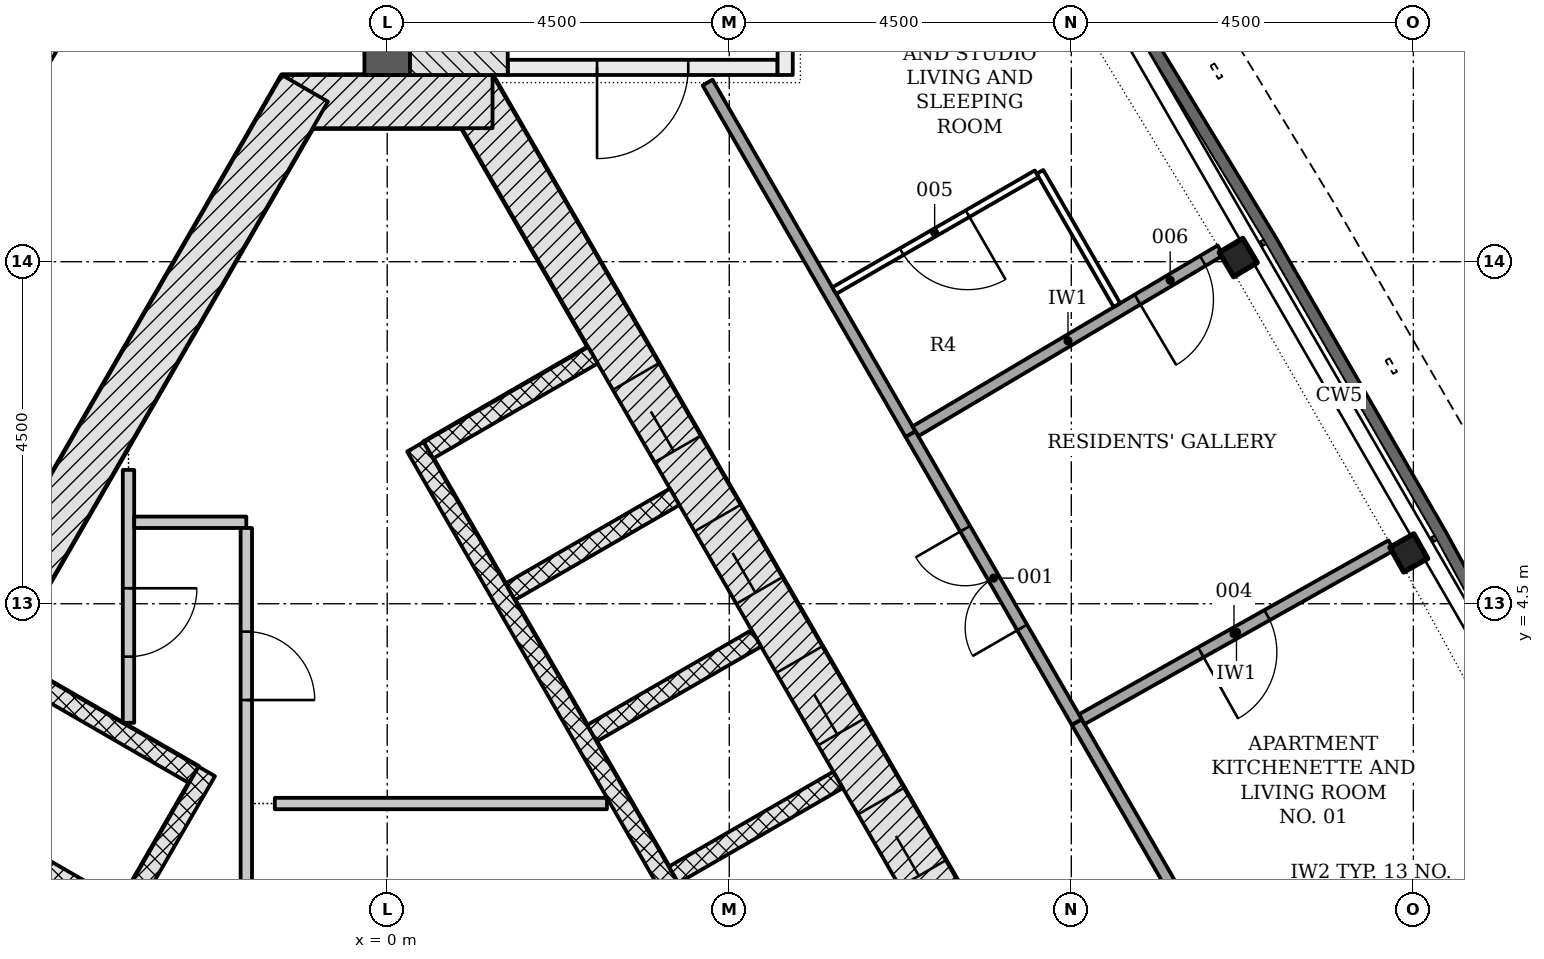
"""IFC4 building model, lengths in metres.
Left out: names, types, materials, properties, quantities, classifications, styles, units other than length and angle.
Written with IfcOpenShell. Run it as: python <this file> out.ifc"""

import sys

from ifc_helpers import new_model, si_unit, direction, frame, frame_2d, origin, origin_2d, place, context, subcontext, project, spatial, rectangle, i_section, extrude, element, fill, save


model = new_model("IFC4")
c1 = context("Model", 3, precision=1e-05, world=origin(), true_north=direction((0.0, 1.0)))
c2 = subcontext(c1, "Body", "Model", "MODEL_VIEW")
j1 = project(units=[si_unit("LENGTHUNIT", "METRE"), si_unit("PLANEANGLEUNIT", "RADIAN")], contexts=[c1])
p1 = place(None, origin())
s1 = spatial("IfcSite", under=j1, at=p1, CompositionType="ELEMENT")
p2 = place(p1, origin())
s2 = spatial("IfcBuilding", under=s1, at=p2, CompositionType="ELEMENT")
p3 = place(p2, frame((0.0, 0.0, 263.4)))
s3 = spatial("IfcBuildingStorey", under=s2, at=p3, CompositionType="ELEMENT", Elevation=263.4)
p4 = place(p3, frame((10.311, -4.703, -0.2), z_axis=(0.0, 0.0, 1.0), x_axis=(-0.500001446645, 0.866024568562, 0.0)))
e1 = element("IfcWall", 1, at=p4, inside=s3, PredefinedType="SHEAR", context=c2, shape_type="SweptSolid", body=[
    extrude(rectangle(XDim=18.458, YDim=0.7, at=frame_2d((9.229, 0.0))), origin(), (0.0, 0.0, 1.0), 3.6),
])
p5 = place(p4, frame((4.379, 0.0, 0.2)))
e2 = element("IfcOpeningElement", 2, at=p5, cuts=e1, PredefinedType="OPENING", context=c2, shape_type="SweptSolid", body=[
    extrude(rectangle(XDim=1.1, YDim=2.1, at=frame_2d((0.55, 1.05))), frame((0.0, 0.36, 0.0), z_axis=(0.0, -1.0, 0.0), x_axis=(1.0, 0.0, 0.0)), (0.0, 0.0, 1.0), 0.72),
])
p6 = place(p4, frame((6.529, 0.0, 0.2)))
e3 = element("IfcOpeningElement", 3, at=p6, cuts=e1, PredefinedType="OPENING", context=c2, shape_type="SweptSolid", body=[
    extrude(rectangle(XDim=1.1, YDim=2.1, at=frame_2d((0.55, 1.05))), frame((0.0, 0.36, 0.0), z_axis=(0.0, -1.0, 0.0), x_axis=(1.0, 0.0, 0.0)), (0.0, 0.0, 1.0), 0.72),
])
p7 = place(p4, frame((8.679, 0.0, 0.2)))
e4 = element("IfcOpeningElement", 4, at=p7, cuts=e1, PredefinedType="OPENING", context=c2, shape_type="SweptSolid", body=[
    extrude(rectangle(XDim=1.1, YDim=2.1, at=frame_2d((0.55, 1.05))), frame((0.0, 0.36, 0.0), z_axis=(0.0, -1.0, 0.0), x_axis=(1.0, 0.0, 0.0)), (0.0, 0.0, 1.0), 0.72),
])
p8 = place(p4, frame((10.829, 0.0, 0.2)))
e5 = element("IfcOpeningElement", 5, at=p8, cuts=e1, PredefinedType="OPENING", context=c2, shape_type="SweptSolid", body=[
    extrude(rectangle(XDim=1.1, YDim=2.1, at=frame_2d((0.55, 1.05))), frame((0.0, 0.36, 0.0), z_axis=(0.0, -1.0, 0.0), x_axis=(1.0, 0.0, 0.0)), (0.0, 0.0, 1.0), 0.72),
])
p9 = place(p4, frame((12.979, 0.0, 0.2)))
e6 = element("IfcOpeningElement", 6, at=p9, cuts=e1, PredefinedType="OPENING", context=c2, shape_type="SweptSolid", body=[
    extrude(rectangle(XDim=1.1, YDim=2.1, at=frame_2d((0.55, 1.05))), frame((0.0, 0.36, 0.0), z_axis=(0.0, -1.0, 0.0), x_axis=(1.0, 0.0, 0.0)), (0.0, 0.0, 1.0), 0.72),
])
p10 = place(p3, frame((1.386, 11.106, -0.2), z_axis=(0.0, 0.0, 1.0), x_axis=(-1.0, 0.0, 0.0)))
e7 = element("IfcWall", 7, at=p10, inside=s3, PredefinedType="SHEAR", context=c2, shape_type="SweptSolid", body=[
    extrude(rectangle(XDim=2.771, YDim=0.7, at=frame_2d((1.386, 0.0))), origin(), (0.0, 0.0, 1.0), 3.6),
])
p11 = place(p3, frame((-1.083, 11.281, -0.2), z_axis=(0.0, 0.0, 1.0), x_axis=(-0.500001446645, -0.866024568562, 0.0)))
e8 = element("IfcWall", 8, at=p11, inside=s3, PredefinedType="SHEAR", context=c2, shape_type="SweptSolid", body=[
    extrude(rectangle(XDim=18.458, YDim=0.7, at=frame_2d((9.229, 0.0))), origin(), (0.0, 0.0, 1.0), 3.6),
])
p12 = place(p11, frame((8.979, 0.0, 0.2)))
e9 = element("IfcOpeningElement", 9, at=p12, cuts=e8, PredefinedType="OPENING", context=c2, shape_type="SweptSolid", body=[
    extrude(rectangle(XDim=1.2, YDim=2.1, at=frame_2d((0.6, 1.05))), frame((0.0, 0.36, 0.0), z_axis=(0.0, -1.0, 0.0), x_axis=(1.0, 0.0, 0.0)), (0.0, 0.0, 1.0), 0.72),
])
p13 = place(p11, frame((11.029, 0.0, 0.2)))
e10 = element("IfcOpeningElement", 10, at=p13, cuts=e8, PredefinedType="OPENING", context=c2, shape_type="SweptSolid", body=[
    extrude(rectangle(XDim=1.2, YDim=2.1, at=frame_2d((0.6, 1.05))), frame((0.0, 0.36, 0.0), z_axis=(0.0, -1.0, 0.0), x_axis=(1.0, 0.0, 0.0)), (0.0, 0.0, 1.0), 0.72),
])
p14 = place(p3, frame((0.0, 11.456, -0.2), z_axis=(0.0, 0.0, 1.0), x_axis=(0.0, 1.0, 0.0)))
e11 = element("IfcWall", 11, at=p14, inside=s3, PredefinedType="SHEAR", context=c2, shape_type="SweptSolid", body=[
    extrude(rectangle(XDim=6.679, YDim=0.6, at=frame_2d((3.339, 0.0))), origin(), (0.0, 0.0, 1.0), 3.6),
])
for number, where, z_axis, x_axis in (
    (12, (13.44, 5.169, -0.2), (0.0, 0.0, 1.0), (-0.49, 0.872, 0.0)),
    (13, (11.196, 9.055, -0.2), (0.0, 0.0, 1.0), (-0.51, 0.86, 0.0)),
):
    element("IfcColumn", number, at=place(p3, frame(where, z_axis=z_axis, x_axis=x_axis)), inside=s3, PredefinedType="COLUMN", context=c2, shape_type="SweptSolid", body=[
        extrude(i_section(OverallWidth=0.371, OverallDepth=0.361, WebThickness=0.012, FlangeThickness=0.02, FilletRadius=0.015, at=origin_2d()), origin(), (0.0, 0.0, 1.0), 3.6),
    ])
p15 = place(p3, frame((5.931, 2.183, -0.2), z_axis=(0.0, 0.0, 1.0), x_axis=(-0.866047370643, -0.499961950354, 0.0)))
e14 = element("IfcWall", 14, at=p15, inside=s3, PredefinedType="PARTITIONING", context=c2, shape_type="SweptSolid", body=[
    extrude(rectangle(XDim=2.5, YDim=0.25, at=frame_2d((1.25, 0.0))), origin(), (0.0, 0.0, 1.0), 3.6),
])
for number, where, z_axis, x_axis in (
    (15, (4.856, 4.045, -0.2), (0.0, 0.0, 1.0), (-0.866, -0.5, 0.0)),
    (16, (3.781, 5.907, -0.2), (0.0, 0.0, 1.0), (-0.866, -0.5, 0.0)),
    (17, (2.706, 7.769, -0.2), (0.0, 0.0, 1.0), (-0.866, -0.5, 0.0)),
):
    element("IfcWall", number, at=place(p3, frame(where, z_axis=z_axis, x_axis=x_axis)), inside=s3, PredefinedType="PARTITIONING", context=c2, shape_type="SweptSolid", body=[
        extrude(rectangle(XDim=2.5, YDim=0.25, at=frame_2d((1.25, 0.0))), origin(), (0.0, 0.0, 1.0), 3.6),
    ])
p16 = place(p3, frame((5.87, -2.961, 0.0), z_axis=(0.0, 0.0, 1.0), x_axis=(-0.50000615651, 0.866021849293, 0.0)))
e18 = element("IfcWall", 18, at=p16, inside=s3, PredefinedType="PARTITIONING", context=c2, shape_type="SweptSolid", body=[
    extrude(rectangle(XDim=11.0, YDim=0.25, at=frame_2d((5.5, 0.0))), origin(), (0.0, 0.0, 1.0), 3.4),
])
for number, where, z_axis, x_axis in (
    (19, (-5.056, 3.699, -0.2), (0.0, 0.0, 1.0), (0.866, -0.5, 0.0)),
    (20, (-6.081, 1.923, -0.2), (0.0, 0.0, 1.0), (0.866, -0.5, 0.0)),
):
    element("IfcWall", number, at=place(p3, frame(where, z_axis=z_axis, x_axis=x_axis)), inside=s3, PredefinedType="PARTITIONING", context=c2, shape_type="SweptSolid", body=[
        extrude(rectangle(XDim=2.9, YDim=0.25, at=frame_2d((1.45, 0.0))), origin(), (0.0, 0.0, 1.0), 3.6),
    ])
p17 = place(p3, frame((-2.374, 2.294, 0.0), z_axis=(0.0, 0.0, 1.0), x_axis=(-0.500003174267, -0.866023571113, 0.0)))
e21 = element("IfcWall", 21, at=p17, inside=s3, PredefinedType="PARTITIONING", context=c2, shape_type="SweptSolid", body=[
    extrude(rectangle(XDim=6.7, YDim=0.25, at=frame_2d((3.35, 0.0))), origin(), (0.0, 0.0, 1.0), 3.4),
])
p18 = place(p3, frame((-3.404, 6.261, 0.0), z_axis=(0.0, 0.0, 1.0), x_axis=(0.0, -1.0, 0.0)))
e22 = element("IfcWall", 22, at=p18, inside=s3, PredefinedType="PARTITIONING", context=c2, shape_type="SweptSolid", body=[
    extrude(rectangle(XDim=3.327, YDim=0.15, at=frame_2d((1.664, 0.0))), origin(), (0.0, 0.0, 1.0), 3.4),
])
p19 = place(p18, frame((1.557, 0.0, 0.0)))
e23 = element("IfcOpeningElement", 23, at=p19, cuts=e22, PredefinedType="OPENING", context=c2, shape_type="SweptSolid", body=[
    extrude(rectangle(XDim=0.9, YDim=2.1, at=frame_2d((0.45, 1.05))), frame((0.0, 0.085, 0.0), z_axis=(0.0, -1.0, 0.0), x_axis=(1.0, 0.0, 0.0)), (0.0, 0.0, 1.0), 0.17),
])
p20 = place(p3, frame((-3.329, 5.572, 0.0), z_axis=(0.0, 0.0, 1.0), x_axis=(1.0, 0.0, 0.0)))
e24 = element("IfcWall", 24, at=p20, inside=s3, PredefinedType="PARTITIONING", context=c2, shape_type="SweptSolid", body=[
    extrude(rectangle(XDim=1.475, YDim=0.15, at=frame_2d((0.737, 0.0))), origin(), (0.0, 0.0, 1.0), 3.4),
])
p21 = place(p3, frame((-1.854, 5.497, 0.0), z_axis=(0.0, 0.0, 1.0), x_axis=(0.0, -1.0, 0.0)))
e25 = element("IfcWall", 25, at=p21, inside=s3, PredefinedType="PARTITIONING", context=c2, shape_type="SweptSolid", body=[
    extrude(rectangle(XDim=11.725, YDim=0.15, at=frame_2d((5.863, 0.0))), origin(), (0.0, 0.0, 1.0), 3.4),
])
p22 = place(p21, frame((5.775, 0.0, 0.0)))
e26 = element("IfcOpeningElement", 26, at=p22, cuts=e25, PredefinedType="OPENING", context=c2, shape_type="SweptSolid", body=[
    extrude(rectangle(XDim=0.9, YDim=2.1, at=frame_2d((0.45, 1.05))), frame((0.0, 0.085, 0.0), z_axis=(0.0, -1.0, 0.0), x_axis=(1.0, 0.0, 0.0)), (0.0, 0.0, 1.0), 0.17),
])
p23 = place(p21, frame((1.364, 0.0, 0.0)))
e27 = element("IfcOpeningElement", 27, at=p23, cuts=e25, PredefinedType="OPENING", context=c2, shape_type="SweptSolid", body=[
    extrude(rectangle(XDim=0.9, YDim=2.1, at=frame_2d((0.45, 1.05))), frame((0.0, 0.085, 0.0), z_axis=(0.0, -1.0, 0.0), x_axis=(1.0, 0.0, 0.0)), (0.0, 0.0, 1.0), 0.17),
])
p24 = place(p3, frame((-1.479, 1.872, 0.0), z_axis=(0.0, 0.0, 1.0), x_axis=(1.0, 0.0, 0.0)))
e28 = element("IfcWall", 28, at=p24, inside=s3, PredefinedType="PARTITIONING", context=c2, shape_type="SweptSolid", body=[
    extrude(rectangle(XDim=4.369, YDim=0.15, at=frame_2d((2.185, 0.0))), origin(), (0.0, 0.0, 1.0), 3.4),
])
p25 = place(p3, frame((5.135, 11.556, -0.2), z_axis=(0.0, 0.0, 1.0), x_axis=(-1.0, 0.0, 0.0)))
e29 = element("IfcWall", 29, at=p25, inside=s3, PredefinedType="SHEAR", context=c2, shape_type="SweptSolid", body=[
    extrude(rectangle(XDim=3.55, YDim=0.2, at=frame_2d((1.775, 0.0))), origin(), (0.0, 0.0, 1.0), 3.6),
])
p26 = place(p25, frame((1.175, 0.0, 0.2)))
e30 = element("IfcOpeningElement", 30, at=p26, cuts=e29, PredefinedType="OPENING", context=c2, shape_type="SweptSolid", body=[
    extrude(rectangle(XDim=1.2, YDim=2.1, at=frame_2d((0.6, 1.05))), frame((0.0, 0.11, 0.0), z_axis=(0.0, -1.0, 0.0), x_axis=(1.0, 0.0, 0.0)), (0.0, 0.0, 1.0), 0.22),
])
p27 = place(p3, frame((5.236, 11.456, -0.2), z_axis=(0.0, 0.0, 1.0), x_axis=(0.0, 1.0, 0.0)))
e31 = element("IfcWall", 31, at=p27, inside=s3, PredefinedType="SHEAR", context=c2, shape_type="SweptSolid", body=[
    extrude(rectangle(XDim=5.6, YDim=0.2, at=frame_2d((2.8, 0.0))), origin(), (0.0, 0.0, 1.0), 3.6),
])
p28 = place(p27, frame((0.45, 0.0, 0.2)))
e32 = element("IfcOpeningElement", 32, at=p28, cuts=e31, PredefinedType="OPENING", context=c2, shape_type="SweptSolid", body=[
    extrude(rectangle(XDim=1.2, YDim=2.1, at=frame_2d((0.6, 1.05))), frame((0.0, 0.11, 0.0), z_axis=(0.0, -1.0, 0.0), x_axis=(1.0, 0.0, 0.0)), (0.0, 0.0, 1.0), 0.22),
])
p29 = place(p3, frame((0.943, 11.456, -0.2), z_axis=(0.0, 0.0, 1.0), x_axis=(0.0, 1.0, 0.0)))
e33 = element("IfcWall", 33, at=p29, inside=s3, PredefinedType="SHEAR", context=c2, shape_type="SweptSolid", body=[
    extrude(rectangle(XDim=6.679, YDim=1.286, at=frame_2d((3.339, 0.0))), origin(), (0.0, 0.0, 1.0), 3.6),
])
p30 = place(p3, frame((15.596, -8.357, 0.0), z_axis=(0.0, 0.0, 1.0), x_axis=(-0.500010741103, 0.866019202317, 0.0)))
e34 = element("IfcWall", 34, at=p30, inside=s3, PredefinedType="PARTITIONING", context=c2, shape_type="SweptSolid", body=[
    extrude(rectangle(XDim=13.049, YDim=0.15, at=frame_2d((6.524, 0.0))), origin(), (0.0, 0.0, 1.0), 2.852),
])
p31 = place(p3, frame((6.885, 6.731, 0.0), z_axis=(0.0, 0.0, 1.0), x_axis=(-0.500003399299, 0.866023441189, 0.0)))
e35 = element("IfcWall", 35, at=p31, inside=s3, PredefinedType="PARTITIONING", context=c2, shape_type="SweptSolid", body=[
    extrude(rectangle(XDim=5.341, YDim=0.15, at=frame_2d((2.67, 0.0))), origin(), (0.0, 0.0, 1.0), 2.852),
])
p32 = place(p3, frame((13.209, 5.269, 0.0), z_axis=(0.0, 0.0, 1.0), x_axis=(-0.871762529681, -0.489928659953, 0.0)))
e36 = element("IfcWall", 36, at=p32, inside=s3, PredefinedType="PARTITIONING", context=c2, shape_type="SweptSolid", body=[
    extrude(rectangle(XDim=4.671, YDim=0.15, at=frame_2d((2.335, 0.0))), origin(), (0.0, 0.0, 1.0), 3.4),
])
p33 = place(p32, frame((1.873, 0.0, 0.0)))
e37 = element("IfcOpeningElement", 37, at=p33, cuts=e36, PredefinedType="OPENING", context=c2, shape_type="SweptSolid", body=[
    extrude(rectangle(XDim=1.0, YDim=2.1, at=frame_2d((0.5, 1.05))), frame((0.0, 0.085, 0.0), z_axis=(0.0, -1.0, 0.0), x_axis=(1.0, 0.0, 0.0)), (0.0, 0.0, 1.0), 0.17),
])
p34 = place(p3, frame((10.963, 9.149, 0.0), z_axis=(0.0, 0.0, 1.0), x_axis=(-0.860158922337, -0.510026105532, 0.0)))
e38 = element("IfcWall", 38, at=p34, inside=s3, PredefinedType="PARTITIONING", context=c2, shape_type="SweptSolid", body=[
    extrude(rectangle(XDim=4.666, YDim=0.15, at=frame_2d((2.333, 0.0))), origin(), (0.0, 0.0, 1.0), 3.4),
])
p35 = place(p34, frame((0.27, 0.0, 0.0)))
e39 = element("IfcOpeningElement", 39, at=p35, cuts=e38, PredefinedType="OPENING", context=c2, shape_type="SweptSolid", body=[
    extrude(rectangle(XDim=1.0, YDim=2.1, at=frame_2d((0.5, 1.05))), frame((0.0, 0.085, 0.0), z_axis=(0.0, -1.0, 0.0), x_axis=(1.0, 0.0, 0.0)), (0.0, 0.0, 1.0), 0.17),
])
p36 = place(p3, frame((9.072, 2.944, 0.0), z_axis=(0.0, 0.0, 1.0), x_axis=(-0.499999494409, 0.866025695687, 0.0)))
e40 = element("IfcWall", 40, at=p36, inside=s3, PredefinedType="PARTITIONING", context=c2, shape_type="SweptSolid", body=[
    extrude(rectangle(XDim=4.374, YDim=0.15, at=frame_2d((2.187, 0.0))), origin(), (0.0, 0.0, 1.0), 2.852),
])
p37 = place(p36, frame((1.437, 0.0, 0.0)))
e41 = element("IfcOpeningElement", 41, at=p37, cuts=e40, PredefinedType="OPENING", context=c2, shape_type="SweptSolid", body=[
    extrude(rectangle(XDim=1.5, YDim=2.1, at=frame_2d((0.75, 1.05))), frame((0.0, 0.085, 0.0), z_axis=(0.0, -1.0, 0.0), x_axis=(1.0, 0.0, 0.0)), (0.0, 0.0, 1.0), 0.17),
])
p38 = place(p3, frame((15.364, 1.337, 0.0), z_axis=(0.0, 0.0, 1.0), x_axis=(-0.882891694615, -0.469576676997, 0.0)))
e42 = element("IfcWall", 42, at=p38, inside=s3, PredefinedType="PARTITIONING", context=c2, shape_type="SweptSolid", body=[
    extrude(rectangle(XDim=4.574, YDim=0.1, at=frame_2d((2.287, 0.0))), origin(), (0.0, 0.0, 1.0), 3.4),
])
p39 = place(p38, frame((0.223, 0.0, 0.0)))
e43 = element("IfcOpeningElement", 43, at=p39, cuts=e42, PredefinedType="OPENING", context=c2, shape_type="SweptSolid", body=[
    extrude(rectangle(XDim=1.0, YDim=2.1, at=frame_2d((0.5, 1.05))), frame((0.0, 0.06, 0.0), z_axis=(0.0, -1.0, 0.0), x_axis=(1.0, 0.0, 0.0)), (0.0, 0.0, 1.0), 0.12),
])
p40 = place(p38, frame((2.548, 0.0, 0.0)))
e44 = element("IfcOpeningElement", 44, at=p40, cuts=e42, PredefinedType="OPENING", context=c2, shape_type="SweptSolid", body=[
    extrude(rectangle(XDim=1.0, YDim=2.1, at=frame_2d((0.5, 1.05))), frame((0.0, 0.06, 0.0), z_axis=(0.0, -1.0, 0.0), x_axis=(1.0, 0.0, 0.0)), (0.0, 0.0, 1.0), 0.12),
])
p41 = place(p3, frame((9.6, 8.428, 0.0), z_axis=(0.0, 0.0, 1.0), x_axis=(-0.499990325971, 0.866030989016, 0.0)))
e45 = element("IfcWall", 45, at=p41, inside=s3, PredefinedType="PARTITIONING", context=c2, shape_type="SweptSolid", body=[
    extrude(rectangle(XDim=2.025, YDim=0.1, at=frame_2d((1.012, 0.0))), origin(), (0.0, 0.0, 1.0), 3.4),
])
p42 = place(p3, frame((8.544, 10.157, 0.0), z_axis=(0.0, 0.0, 1.0), x_axis=(-0.866016353143, -0.500015675843, 0.0)))
e46 = element("IfcWall", 46, at=p42, inside=s3, PredefinedType="PARTITIONING", context=c2, shape_type="SweptSolid", body=[
    extrude(rectangle(XDim=3.075, YDim=0.1, at=frame_2d((1.538, 0.0))), origin(), (0.0, 0.0, 1.0), 3.4),
])
p43 = place(p42, frame((1.05, 0.0, 0.0)))
e47 = element("IfcOpeningElement", 47, at=p43, cuts=e46, PredefinedType="OPENING", context=c2, shape_type="SweptSolid", body=[
    extrude(rectangle(XDim=1.0, YDim=2.1, at=frame_2d((0.5, 1.05))), frame((0.0, 0.06, 0.0), z_axis=(0.0, -1.0, 0.0), x_axis=(1.0, 0.0, 0.0)), (0.0, 0.0, 1.0), 0.12),
])
p44 = place(p3, frame((-0.723, 18.205, 0.0), z_axis=(0.0, 0.0, 1.0), x_axis=(-0.500010391421, -0.866019404212, 0.0)))
e48 = element("IfcWall", 48, at=p44, inside=s3, PredefinedType="PARTITIONING", context=c2, shape_type="SweptSolid", body=[
    extrude(rectangle(XDim=9.028, YDim=0.15, at=frame_2d((4.514, 0.0))), origin(), (0.0, 0.0, 1.0), 2.852),
])
p45 = place(p6, origin())
e49 = element("IfcDoor", 49, at=p45, inside=s3, OperationType="DOUBLE_DOOR_SLIDING", PredefinedType="DOOR", context=c2, shape_type="SweptSolid", body=[
    extrude(rectangle(XDim=1.1, YDim=2.1, at=frame_2d((0.55, 1.05))), frame((0.0, 0.025, 0.0), z_axis=(0.0, -1.0, 0.0), x_axis=(1.0, 0.0, 0.0)), (0.0, 0.0, 1.0), 0.05),
])
fill(e3, e49)
p46 = place(p7, origin())
e50 = element("IfcDoor", 50, at=p46, inside=s3, OperationType="DOUBLE_DOOR_SLIDING", PredefinedType="DOOR", context=c2, shape_type="SweptSolid", body=[
    extrude(rectangle(XDim=1.1, YDim=2.1, at=frame_2d((0.55, 1.05))), frame((0.0, 0.025, 0.0), z_axis=(0.0, -1.0, 0.0), x_axis=(1.0, 0.0, 0.0)), (0.0, 0.0, 1.0), 0.05),
])
fill(e4, e50)
p47 = place(p8, origin())
e51 = element("IfcDoor", 51, at=p47, inside=s3, OperationType="DOUBLE_DOOR_SLIDING", PredefinedType="DOOR", context=c2, shape_type="SweptSolid", body=[
    extrude(rectangle(XDim=1.1, YDim=2.1, at=frame_2d((0.55, 1.05))), frame((0.0, 0.025, 0.0), z_axis=(0.0, -1.0, 0.0), x_axis=(1.0, 0.0, 0.0)), (0.0, 0.0, 1.0), 0.05),
])
fill(e5, e51)
p48 = place(p9, origin())
e52 = element("IfcDoor", 52, at=p48, inside=s3, OperationType="DOUBLE_DOOR_SLIDING", PredefinedType="DOOR", context=c2, shape_type="SweptSolid", body=[
    extrude(rectangle(XDim=1.1, YDim=2.1, at=frame_2d((0.55, 1.05))), frame((0.0, 0.025, 0.0), z_axis=(0.0, -1.0, 0.0), x_axis=(1.0, 0.0, 0.0)), (0.0, 0.0, 1.0), 0.05),
])
fill(e6, e52)
p49 = place(p19, origin())
e53 = element("IfcDoor", 53, at=p49, inside=s3, OperationType="SINGLE_SWING_LEFT", PredefinedType="DOOR", context=c2, shape_type="SweptSolid", body=[
    extrude(rectangle(XDim=0.9, YDim=2.1, at=frame_2d((0.45, 1.05))), frame((0.0, 0.025, 0.0), z_axis=(0.0, -1.0, 0.0), x_axis=(1.0, 0.0, 0.0)), (0.0, 0.0, 1.0), 0.05),
])
fill(e23, e53)
p50 = place(p23, origin())
e54 = element("IfcDoor", 54, at=p50, inside=s3, OperationType="SINGLE_SWING_RIGHT", PredefinedType="DOOR", context=c2, shape_type="SweptSolid", body=[
    extrude(rectangle(XDim=0.9, YDim=2.1, at=frame_2d((0.45, 1.05))), frame((0.0, 0.025, 0.0), z_axis=(0.0, -1.0, 0.0), x_axis=(1.0, 0.0, 0.0)), (0.0, 0.0, 1.0), 0.05),
])
fill(e27, e54)
p51 = place(p26, origin())
e55 = element("IfcDoor", 55, at=p51, inside=s3, OperationType="SINGLE_SWING_RIGHT", PredefinedType="DOOR", context=c2, shape_type="SweptSolid", body=[
    extrude(rectangle(XDim=1.2, YDim=2.1, at=frame_2d((0.6, 1.05))), frame((0.0, 0.025, 0.0), z_axis=(0.0, -1.0, 0.0), x_axis=(1.0, 0.0, 0.0)), (0.0, 0.0, 1.0), 0.05),
])
fill(e30, e55)
p52 = place(p37, origin())
e56 = element("IfcDoor", 56, at=p52, inside=s3, OperationType="DOUBLE_DOOR_SINGLE_SWING", PredefinedType="DOOR", context=c2, shape_type="SweptSolid", body=[
    extrude(rectangle(XDim=1.5, YDim=2.1, at=frame_2d((0.75, 1.05))), frame((0.0, 0.025, 0.0), z_axis=(0.0, -1.0, 0.0), x_axis=(1.0, 0.0, 0.0)), (0.0, 0.0, 1.0), 0.05),
])
fill(e41, e56)
p53 = place(p33, origin())
e57 = element("IfcDoor", 57, at=p53, inside=s3, OperationType="SINGLE_SWING_RIGHT", PredefinedType="DOOR", context=c2, shape_type="SweptSolid", body=[
    extrude(rectangle(XDim=1.0, YDim=2.1, at=frame_2d((0.5, 1.05))), frame((0.0, 0.025, 0.0), z_axis=(0.0, -1.0, 0.0), x_axis=(1.0, 0.0, 0.0)), (0.0, 0.0, 1.0), 0.05),
])
fill(e37, e57)
p54 = place(p43, origin())
e58 = element("IfcDoor", 58, at=p54, inside=s3, OperationType="SINGLE_SWING_LEFT", PredefinedType="DOOR", context=c2, shape_type="SweptSolid", body=[
    extrude(rectangle(XDim=1.0, YDim=2.1, at=frame_2d((0.5, 1.05))), frame((0.0, 0.025, 0.0), z_axis=(0.0, -1.0, 0.0), x_axis=(1.0, 0.0, 0.0)), (0.0, 0.0, 1.0), 0.05),
])
fill(e47, e58)
p55 = place(p35, origin())
e59 = element("IfcDoor", 59, at=p55, inside=s3, OperationType="SINGLE_SWING_RIGHT", PredefinedType="DOOR", context=c2, shape_type="SweptSolid", body=[
    extrude(rectangle(XDim=1.0, YDim=2.1, at=frame_2d((0.5, 1.05))), frame((0.0, 0.025, 0.0), z_axis=(0.0, -1.0, 0.0), x_axis=(1.0, 0.0, 0.0)), (0.0, 0.0, 1.0), 0.05),
])
fill(e39, e59)
save(model, sys.argv[1])
